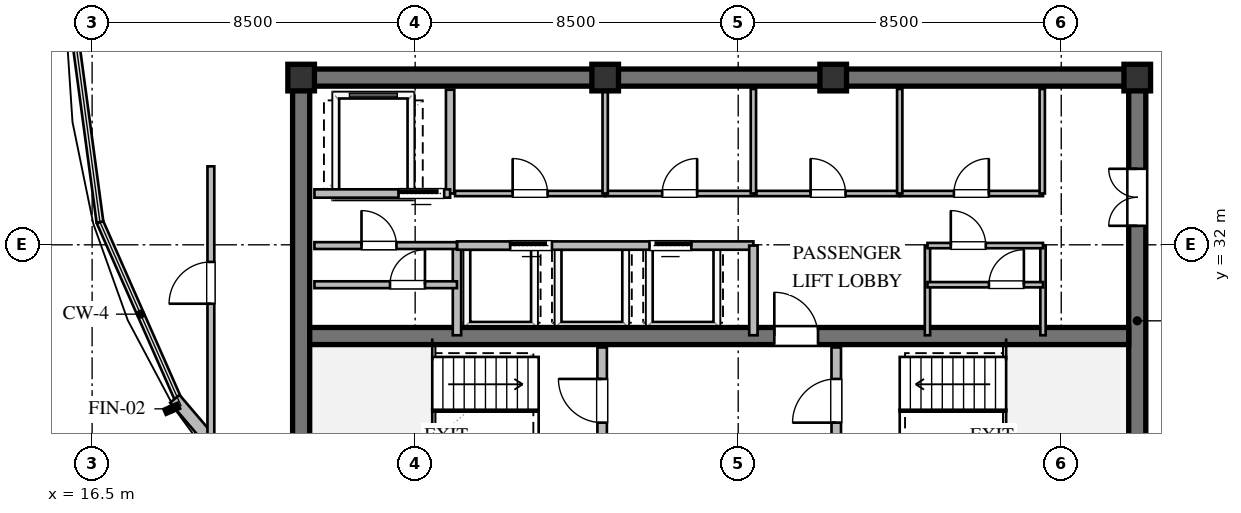
"""IFC4 building model, lengths in metres.
Left out: names, types, materials, properties, quantities, classifications, styles, units other than length and angle.
Written with IfcOpenShell. Run it as: python <this file> out.ifc"""

import sys

from ifc_helpers import new_model, si_unit, direction, frame, frame_2d, origin, origin_2d, place, context, subcontext, project, spatial, rectangle, extrude, element, fill, save


model = new_model("IFC4")
c1 = context("Model", 3, precision=1e-05, world=origin(), true_north=direction((0.0, 1.0)))
c2 = subcontext(c1, "Body", "Model", "MODEL_VIEW")
j1 = project(units=[si_unit("LENGTHUNIT", "METRE"), si_unit("PLANEANGLEUNIT", "RADIAN")], contexts=[c1])
p1 = place(None, origin())
s1 = spatial("IfcSite", under=j1, at=p1, CompositionType="ELEMENT")
p2 = place(p1, origin())
s2 = spatial("IfcBuilding", under=s1, at=p2, CompositionType="ELEMENT")
p3 = place(p2, frame((0.0, 0.0, 270.0)))
s3 = spatial("IfcBuildingStorey", under=s2, at=p3, CompositionType="ELEMENT", Elevation=270.0)
p4 = place(p3, frame((21.775, 36.4, 0.0), z_axis=(0.0, 0.0, 1.0), x_axis=(1.0, 0.0, 0.0)))
e1 = element("IfcWall", 1, at=p4, inside=s3, PredefinedType="SHEAR", context=c2, shape_type="SweptSolid", body=[
    extrude(rectangle(XDim=22.45, YDim=0.45, at=frame_2d((11.225, 0.0))), origin(), (0.0, 0.0, 1.0), 3.56),
])
p5 = place(p3, frame((22.0, 23.825, 0.0), z_axis=(0.0, 0.0, 1.0), x_axis=(0.0, 1.0, 0.0)))
e2 = element("IfcWall", 2, at=p5, inside=s3, PredefinedType="SHEAR", context=c2, shape_type="SweptSolid", body=[
    extrude(rectangle(XDim=12.35, YDim=0.45, at=frame_2d((6.175, 0.0))), origin(), (0.0, 0.0, 1.0), 3.56),
])
p6 = place(p3, frame((44.0, 23.825, 0.0), z_axis=(0.0, 0.0, 1.0), x_axis=(0.0, 1.0, 0.0)))
e3 = element("IfcWall", 3, at=p6, inside=s3, PredefinedType="SHEAR", context=c2, shape_type="SweptSolid", body=[
    extrude(rectangle(XDim=12.35, YDim=0.45, at=frame_2d((6.175, 0.0))), origin(), (0.0, 0.0, 1.0), 3.56),
])
p7 = place(p6, frame((8.675, 0.0, 0.0)))
e4 = element("IfcOpeningElement", 4, at=p7, cuts=e3, PredefinedType="OPENING", context=c2, shape_type="SweptSolid", body=[
    extrude(rectangle(XDim=1.5, YDim=2.15, at=frame_2d((0.75, 1.075))), frame((0.0, 0.235, 0.0), z_axis=(0.0, -1.0, 0.0), x_axis=(1.0, 0.0, 0.0)), (0.0, 0.0, 1.0), 0.47),
])
p8 = place(p3, frame((22.225, 29.6, 0.0), z_axis=(0.0, 0.0, 1.0), x_axis=(1.0, 0.0, 0.0)))
e5 = element("IfcWall", 5, at=p8, inside=s3, PredefinedType="SHEAR", context=c2, shape_type="SweptSolid", body=[
    extrude(rectangle(XDim=21.55, YDim=0.45, at=frame_2d((10.775, 0.0))), origin(), (0.0, 0.0, 1.0), 3.56),
])
p9 = place(p8, frame((12.225, 0.0, 0.0)))
e6 = element("IfcOpeningElement", 6, at=p9, cuts=e5, PredefinedType="OPENING", context=c2, shape_type="SweptSolid", body=[
    extrude(rectangle(XDim=1.15, YDim=2.1, at=frame_2d((0.575, 1.05))), frame((0.0, 0.235, 0.0), z_axis=(0.0, -1.0, 0.0), x_axis=(1.0, 0.0, 0.0)), (0.0, 0.0, 1.0), 0.47),
])
for number, where, z_axis, x_axis in (
    (7, (44.0, 36.4, 0.0), (0.0, 0.0, 1.0), (1.0, 0.0, 0.0)),
    (8, (36.0, 36.4, 0.0), (0.0, 0.0, 1.0), (1.0, 0.0, 0.0)),
    (9, (30.0, 36.4, 0.0), (0.0, 0.0, 1.0), (1.0, 0.0, 0.0)),
    (10, (22.0, 36.4, 0.0), (0.0, 0.0, 1.0), (1.0, 0.0, 0.0)),
):
    element("IfcColumn", number, at=place(p3, frame(where, z_axis=z_axis, x_axis=x_axis)), inside=s3, PredefinedType="COLUMN", context=c2, shape_type="SweptSolid", body=[
        extrude(rectangle(XDim=0.7, YDim=0.7, at=origin_2d()), origin(), (0.0, 0.0, 1.0), 3.8),
    ])
p10 = place(p3, frame((22.46, 23.506, 0.0), z_axis=(0.0, 0.0, 1.0), x_axis=(-0.648393724369, 0.761305180725, 0.0)))
e11 = element("IfcWall", 11, at=p10, inside=s3, PredefinedType="STANDARD", context=c2, shape_type="SweptSolid", body=[
    extrude(rectangle(XDim=5.836, YDim=0.32, at=frame_2d((2.918, 0.0))), origin(), (0.0, 0.0, 1.0), 2.7),
])
p11 = place(p3, frame((29.92, 23.9, 0.0), z_axis=(0.0, 0.0, 1.0), x_axis=(0.0, 1.0, 0.0)))
e12 = element("IfcWall", 12, at=p11, inside=s3, PredefinedType="SOLIDWALL", context=c2, shape_type="SweptSolid", body=[
    extrude(rectangle(XDim=5.4, YDim=0.25, at=frame_2d((2.7, 0.0))), origin(), (0.0, 0.0, 1.0), 3.09),
])
p12 = place(p11, frame((3.421, 0.0, 0.0)))
e13 = element("IfcOpeningElement", 13, at=p12, cuts=e12, PredefinedType="OPENING", context=c2, shape_type="SweptSolid", body=[
    extrude(rectangle(XDim=1.15, YDim=2.1, at=frame_2d((0.575, 1.05))), frame((0.0, 0.135, 0.0), z_axis=(0.0, -1.0, 0.0), x_axis=(1.0, 0.0, 0.0)), (0.0, 0.0, 1.0), 0.27),
])
p13 = place(p3, frame((36.08, 23.9, 0.0), z_axis=(0.0, 0.0, 1.0), x_axis=(0.0, 1.0, 0.0)))
e14 = element("IfcWall", 14, at=p13, inside=s3, PredefinedType="SOLIDWALL", context=c2, shape_type="SweptSolid", body=[
    extrude(rectangle(XDim=5.4, YDim=0.25, at=frame_2d((2.7, 0.0))), origin(), (0.0, 0.0, 1.0), 3.56),
])
p14 = place(p13, frame((3.421, 0.0, 0.0)))
e15 = element("IfcOpeningElement", 15, at=p14, cuts=e14, PredefinedType="OPENING", context=c2, shape_type="SweptSolid", body=[
    extrude(rectangle(XDim=1.15, YDim=2.1, at=frame_2d((0.575, 1.05))), frame((0.0, 0.135, 0.0), z_axis=(0.0, -1.0, 0.0), x_axis=(1.0, 0.0, 0.0)), (0.0, 0.0, 1.0), 0.27),
])
p15 = place(p3, frame((25.92, 33.35, 0.0), z_axis=(0.0, 0.0, 1.0), x_axis=(0.0, 1.0, 0.0)))
e16 = element("IfcWall", 16, at=p15, inside=s3, PredefinedType="SOLIDWALL", context=c2, shape_type="SweptSolid", body=[
    extrude(rectangle(XDim=2.73, YDim=0.22, at=frame_2d((1.365, 0.0))), origin(), (0.0, 0.0, 1.0), 3.56),
])
p16 = place(p3, frame((22.35, 33.35, 0.0), z_axis=(0.0, 0.0, 1.0), x_axis=(1.0, 0.0, 0.0)))
e17 = element("IfcWall", 17, at=p16, inside=s3, PredefinedType="SOLIDWALL", context=c2, shape_type="SweptSolid", body=[
    extrude(rectangle(XDim=3.57, YDim=0.22, at=frame_2d((1.785, 0.0))), origin(), (0.0, 0.0, 1.0), 3.56),
])
p17 = place(p16, frame((2.213, 0.0, 0.0)))
e18 = element("IfcOpeningElement", 18, at=p17, cuts=e17, PredefinedType="OPENING", context=c2, shape_type="SweptSolid", body=[
    extrude(rectangle(XDim=1.2, YDim=2.1, at=frame_2d((0.6, 1.05))), frame((0.0, 0.12, 0.0), z_axis=(0.0, -1.0, 0.0), x_axis=(1.0, 0.0, 0.0)), (0.0, 0.0, 1.0), 0.24),
])
p18 = place(p3, frame((26.1, 29.62, 0.0), z_axis=(0.0, 0.0, 1.0), x_axis=(0.0, 1.0, 0.0)))
e19 = element("IfcWall", 19, at=p18, inside=s3, PredefinedType="SOLIDWALL", context=c2, shape_type="SweptSolid", body=[
    extrude(rectangle(XDim=2.36, YDim=0.22, at=frame_2d((1.18, 0.0))), origin(), (0.0, 0.0, 1.0), 3.56),
])
p19 = place(p3, frame((26.1, 31.98, 0.0), z_axis=(0.0, 0.0, 1.0), x_axis=(1.0, 0.0, 0.0)))
e20 = element("IfcWall", 20, at=p19, inside=s3, PredefinedType="SOLIDWALL", context=c2, shape_type="SweptSolid", body=[
    extrude(rectangle(XDim=7.8, YDim=0.22, at=frame_2d((3.9, 0.0))), origin(), (0.0, 0.0, 1.0), 3.56),
])
p20 = place(p19, frame((1.4, 0.0, 0.0)))
e21 = element("IfcOpeningElement", 21, at=p20, cuts=e20, PredefinedType="OPENING", context=c2, shape_type="SweptSolid", body=[
    extrude(rectangle(XDim=1.1, YDim=2.1, at=frame_2d((0.55, 1.05))), frame((0.0, 0.12, 0.0), z_axis=(0.0, -1.0, 0.0), x_axis=(1.0, 0.0, 0.0)), (0.0, 0.0, 1.0), 0.24),
])
p21 = place(p19, frame((5.066, 0.0, 0.0)))
e22 = element("IfcOpeningElement", 22, at=p21, cuts=e20, PredefinedType="OPENING", context=c2, shape_type="SweptSolid", body=[
    extrude(rectangle(XDim=1.1, YDim=2.1, at=frame_2d((0.55, 1.05))), frame((0.0, 0.12, 0.0), z_axis=(0.0, -1.0, 0.0), x_axis=(1.0, 0.0, 0.0)), (0.0, 0.0, 1.0), 0.24),
])
p22 = place(p3, frame((33.9, 29.62, 0.0), z_axis=(0.0, 0.0, 1.0), x_axis=(0.0, 1.0, 0.0)))
e23 = element("IfcWall", 23, at=p22, inside=s3, PredefinedType="SOLIDWALL", context=c2, shape_type="SweptSolid", body=[
    extrude(rectangle(XDim=2.36, YDim=0.22, at=frame_2d((1.18, 0.0))), origin(), (0.0, 0.0, 1.0), 3.56),
])
p23 = place(p3, frame((26.05, 33.35, 0.0), z_axis=(0.0, 0.0, 1.0), x_axis=(1.0, 0.0, 0.0)))
e24 = element("IfcWall", 24, at=p23, inside=s3, PredefinedType="PARTITIONING", context=c2, shape_type="SweptSolid", body=[
    extrude(rectangle(XDim=3.95, YDim=0.14, at=frame_2d((1.975, 0.0))), origin(), (0.0, 0.0, 1.0), 3.56),
])
p24 = place(p23, frame((1.515, 0.0, 0.0)))
e25 = element("IfcOpeningElement", 25, at=p24, cuts=e24, PredefinedType="OPENING", context=c2, shape_type="SweptSolid", body=[
    extrude(rectangle(XDim=0.92, YDim=2.1, at=frame_2d((0.46, 1.05))), frame((0.0, 0.08, 0.0), z_axis=(0.0, -1.0, 0.0), x_axis=(1.0, 0.0, 0.0)), (0.0, 0.0, 1.0), 0.16),
])
p25 = place(p3, frame((30.0, 33.35, 0.0), z_axis=(0.0, 0.0, 1.0), x_axis=(1.0, 0.0, 0.0)))
e26 = element("IfcWall", 26, at=p25, inside=s3, PredefinedType="PARTITIONING", context=c2, shape_type="SweptSolid", body=[
    extrude(rectangle(XDim=3.92, YDim=0.14, at=frame_2d((1.96, 0.0))), origin(), (0.0, 0.0, 1.0), 3.56),
])
p26 = place(p25, frame((1.5, 0.0, 0.0)))
e27 = element("IfcOpeningElement", 27, at=p26, cuts=e26, PredefinedType="OPENING", context=c2, shape_type="SweptSolid", body=[
    extrude(rectangle(XDim=0.92, YDim=2.1, at=frame_2d((0.46, 1.05))), frame((0.0, 0.08, 0.0), z_axis=(0.0, -1.0, 0.0), x_axis=(1.0, 0.0, 0.0)), (0.0, 0.0, 1.0), 0.16),
])
for number, where, z_axis, x_axis in (
    (28, (30.0, 33.35, 0.0), (0.0, 0.0, 1.0), (0.0, 1.0, 0.0)),
    (29, (33.9, 33.35, 0.0), (0.0, 0.0, 1.0), (0.0, 1.0, 0.0)),
):
    element("IfcWall", number, at=place(p3, frame(where, z_axis=z_axis, x_axis=x_axis)), inside=s3, PredefinedType="PARTITIONING", context=c2, shape_type="SweptSolid", body=[
        extrude(rectangle(XDim=2.75, YDim=0.14, at=frame_2d((1.375, 0.0))), origin(), (0.0, 0.0, 1.0), 3.56),
    ])
p27 = place(p3, frame((33.98, 33.35, 0.0), z_axis=(0.0, 0.0, 1.0), x_axis=(1.0, 0.0, 0.0)))
e30 = element("IfcWall", 30, at=p27, inside=s3, PredefinedType="PARTITIONING", context=c2, shape_type="SweptSolid", body=[
    extrude(rectangle(XDim=3.77, YDim=0.14, at=frame_2d((1.885, 0.0))), origin(), (0.0, 0.0, 1.0), 3.56),
])
p28 = place(p27, frame((1.425, 0.0, 0.0)))
e31 = element("IfcOpeningElement", 31, at=p28, cuts=e30, PredefinedType="OPENING", context=c2, shape_type="SweptSolid", body=[
    extrude(rectangle(XDim=0.92, YDim=2.1, at=frame_2d((0.46, 1.05))), frame((0.0, 0.08, 0.0), z_axis=(0.0, -1.0, 0.0), x_axis=(1.0, 0.0, 0.0)), (0.0, 0.0, 1.0), 0.16),
])
p29 = place(p3, frame((37.75, 33.35, 0.0), z_axis=(0.0, 0.0, 1.0), x_axis=(1.0, 0.0, 0.0)))
e32 = element("IfcWall", 32, at=p29, inside=s3, PredefinedType="PARTITIONING", context=c2, shape_type="SweptSolid", body=[
    extrude(rectangle(XDim=3.77, YDim=0.14, at=frame_2d((1.885, 0.0))), origin(), (0.0, 0.0, 1.0), 3.56),
])
p30 = place(p29, frame((1.425, 0.0, 0.0)))
e33 = element("IfcOpeningElement", 33, at=p30, cuts=e32, PredefinedType="OPENING", context=c2, shape_type="SweptSolid", body=[
    extrude(rectangle(XDim=0.92, YDim=2.1, at=frame_2d((0.46, 1.05))), frame((0.0, 0.08, 0.0), z_axis=(0.0, -1.0, 0.0), x_axis=(1.0, 0.0, 0.0)), (0.0, 0.0, 1.0), 0.16),
])
for number, where, z_axis, x_axis in (
    (34, (37.75, 33.35, 0.0), (0.0, 0.0, 1.0), (0.0, 1.0, 0.0)),
    (35, (41.5, 33.35, 0.0), (0.0, 0.0, 1.0), (0.0, 1.0, 0.0)),
):
    element("IfcWall", number, at=place(p3, frame(where, z_axis=z_axis, x_axis=x_axis)), inside=s3, PredefinedType="PARTITIONING", context=c2, shape_type="SweptSolid", body=[
        extrude(rectangle(XDim=2.75, YDim=0.14, at=frame_2d((1.375, 0.0))), origin(), (0.0, 0.0, 1.0), 3.56),
    ])
p31 = place(p3, frame((22.35, 30.95, 0.0), z_axis=(0.0, 0.0, 1.0), x_axis=(1.0, 0.0, 0.0)))
e36 = element("IfcWall", 36, at=p31, inside=s3, PredefinedType="PARTITIONING", context=c2, shape_type="SweptSolid", body=[
    extrude(rectangle(XDim=3.75, YDim=0.18, at=frame_2d((1.875, 0.0))), origin(), (0.0, 0.0, 1.0), 3.56),
])
p32 = place(p31, frame((1.988, 0.0, 0.0)))
e37 = element("IfcOpeningElement", 37, at=p32, cuts=e36, PredefinedType="OPENING", context=c2, shape_type="SweptSolid", body=[
    extrude(rectangle(XDim=0.92, YDim=2.1, at=frame_2d((0.46, 1.05))), frame((0.0, 0.1, 0.0), z_axis=(0.0, -1.0, 0.0), x_axis=(1.0, 0.0, 0.0)), (0.0, 0.0, 1.0), 0.2),
])
p33 = place(p3, frame((22.35, 31.98, 0.0), z_axis=(0.0, 0.0, 1.0), x_axis=(1.0, 0.0, 0.0)))
e38 = element("IfcWall", 38, at=p33, inside=s3, PredefinedType="PARTITIONING", context=c2, shape_type="SweptSolid", body=[
    extrude(rectangle(XDim=3.75, YDim=0.18, at=frame_2d((1.875, 0.0))), origin(), (0.0, 0.0, 1.0), 3.56),
])
p34 = place(p33, frame((1.238, 0.0, 0.0)))
e39 = element("IfcOpeningElement", 39, at=p34, cuts=e38, PredefinedType="OPENING", context=c2, shape_type="SweptSolid", body=[
    extrude(rectangle(XDim=0.92, YDim=2.1, at=frame_2d((0.46, 1.05))), frame((0.0, 0.1, 0.0), z_axis=(0.0, -1.0, 0.0), x_axis=(1.0, 0.0, 0.0)), (0.0, 0.0, 1.0), 0.2),
])
for number, where, z_axis, x_axis in (
    (40, (38.48, 29.62, 0.0), (0.0, 0.0, 1.0), (0.0, 1.0, 0.0)),
    (41, (41.52, 29.62, 0.0), (0.0, 0.0, 1.0), (0.0, 1.0, 0.0)),
):
    element("IfcWall", number, at=place(p3, frame(where, z_axis=z_axis, x_axis=x_axis)), inside=s3, PredefinedType="PARTITIONING", context=c2, shape_type="SweptSolid", body=[
        extrude(rectangle(XDim=2.36, YDim=0.14, at=frame_2d((1.18, 0.0))), origin(), (0.0, 0.0, 1.0), 3.56),
    ])
p35 = place(p3, frame((38.48, 30.95, 0.0), z_axis=(0.0, 0.0, 1.0), x_axis=(1.0, 0.0, 0.0)))
e42 = element("IfcWall", 42, at=p35, inside=s3, PredefinedType="PARTITIONING", context=c2, shape_type="SweptSolid", body=[
    extrude(rectangle(XDim=3.04, YDim=0.14, at=frame_2d((1.52, 0.0))), origin(), (0.0, 0.0, 1.0), 3.56),
])
p36 = place(p35, frame((1.617, 0.0, 0.0)))
e43 = element("IfcOpeningElement", 43, at=p36, cuts=e42, PredefinedType="OPENING", context=c2, shape_type="SweptSolid", body=[
    extrude(rectangle(XDim=0.92, YDim=2.1, at=frame_2d((0.46, 1.05))), frame((0.0, 0.08, 0.0), z_axis=(0.0, -1.0, 0.0), x_axis=(1.0, 0.0, 0.0)), (0.0, 0.0, 1.0), 0.16),
])
p37 = place(p3, frame((38.48, 31.98, 0.0), z_axis=(0.0, 0.0, 1.0), x_axis=(1.0, 0.0, 0.0)))
e44 = element("IfcWall", 44, at=p37, inside=s3, PredefinedType="PARTITIONING", context=c2, shape_type="SweptSolid", body=[
    extrude(rectangle(XDim=3.04, YDim=0.14, at=frame_2d((1.52, 0.0))), origin(), (0.0, 0.0, 1.0), 3.56),
])
p38 = place(p37, frame((0.614, 0.0, 0.0)))
e45 = element("IfcOpeningElement", 45, at=p38, cuts=e44, PredefinedType="OPENING", context=c2, shape_type="SweptSolid", body=[
    extrude(rectangle(XDim=0.92, YDim=2.1, at=frame_2d((0.46, 1.05))), frame((0.0, 0.08, 0.0), z_axis=(0.0, -1.0, 0.0), x_axis=(1.0, 0.0, 0.0)), (0.0, 0.0, 1.0), 0.16),
])
p39 = place(p3, frame((19.625, 26.845, 0.0), z_axis=(0.0, 0.0, 1.0), x_axis=(0.0, 1.0, 0.0)))
e46 = element("IfcWall", 46, at=p39, inside=s3, PredefinedType="PARTITIONING", context=c2, shape_type="SweptSolid", body=[
    extrude(rectangle(XDim=7.22, YDim=0.18, at=frame_2d((3.61, 0.0))), origin(), (0.0, 0.0, 1.0), 3.017),
])
p40 = place(p39, frame((3.605, 0.0, 0.0)))
e47 = element("IfcOpeningElement", 47, at=p40, cuts=e46, PredefinedType="OPENING", context=c2, shape_type="SweptSolid", body=[
    extrude(rectangle(XDim=1.1, YDim=2.1, at=frame_2d((0.55, 1.05))), frame((0.0, 0.1, 0.0), z_axis=(0.0, -1.0, 0.0), x_axis=(1.0, 0.0, 0.0)), (0.0, 0.0, 1.0), 0.2),
])
p41 = place(p12, origin())
e48 = element("IfcDoor", 48, at=p41, inside=s3, OperationType="SINGLE_SWING_RIGHT", PredefinedType="DOOR", context=c2, shape_type="SweptSolid", body=[
    extrude(rectangle(XDim=1.15, YDim=2.1, at=frame_2d((0.575, 1.05))), frame((0.0, 0.025, 0.0), z_axis=(0.0, -1.0, 0.0), x_axis=(1.0, 0.0, 0.0)), (0.0, 0.0, 1.0), 0.05),
])
fill(e13, e48)
p42 = place(p14, origin())
e49 = element("IfcDoor", 49, at=p42, inside=s3, OperationType="SINGLE_SWING_LEFT", PredefinedType="DOOR", context=c2, shape_type="SweptSolid", body=[
    extrude(rectangle(XDim=1.15, YDim=2.1, at=frame_2d((0.575, 1.05))), frame((0.0, 0.025, 0.0), z_axis=(0.0, -1.0, 0.0), x_axis=(1.0, 0.0, 0.0)), (0.0, 0.0, 1.0), 0.05),
])
fill(e15, e49)
p43 = place(p9, origin())
e50 = element("IfcDoor", 50, at=p43, inside=s3, OperationType="SINGLE_SWING_LEFT", PredefinedType="DOOR", context=c2, shape_type="SweptSolid", body=[
    extrude(rectangle(XDim=1.15, YDim=2.1, at=frame_2d((0.575, 1.05))), frame((0.0, 0.025, 0.0), z_axis=(0.0, -1.0, 0.0), x_axis=(1.0, 0.0, 0.0)), (0.0, 0.0, 1.0), 0.05),
])
fill(e6, e50)
p44 = place(p7, origin())
e51 = element("IfcDoor", 51, at=p44, inside=s3, OperationType="DOUBLE_DOOR_SINGLE_SWING", PredefinedType="DOOR", context=c2, shape_type="SweptSolid", body=[
    extrude(rectangle(XDim=1.5, YDim=2.15, at=frame_2d((0.75, 1.075))), frame((0.0, 0.025, 0.0), z_axis=(0.0, -1.0, 0.0), x_axis=(1.0, 0.0, 0.0)), (0.0, 0.0, 1.0), 0.05),
])
fill(e4, e51)
p45 = place(p17, origin())
e52 = element("IfcDoor", 52, at=p45, inside=s3, OperationType="SLIDING_TO_LEFT", PredefinedType="DOOR", context=c2, shape_type="SweptSolid", body=[
    extrude(rectangle(XDim=1.2, YDim=2.1, at=frame_2d((0.6, 1.05))), frame((0.0, 0.025, 0.0), z_axis=(0.0, -1.0, 0.0), x_axis=(1.0, 0.0, 0.0)), (0.0, 0.0, 1.0), 0.05),
])
fill(e18, e52)
p46 = place(p20, origin())
e53 = element("IfcDoor", 53, at=p46, inside=s3, OperationType="SLIDING_TO_LEFT", PredefinedType="DOOR", context=c2, shape_type="SweptSolid", body=[
    extrude(rectangle(XDim=1.1, YDim=2.1, at=frame_2d((0.55, 1.05))), frame((0.0, 0.025, 0.0), z_axis=(0.0, -1.0, 0.0), x_axis=(1.0, 0.0, 0.0)), (0.0, 0.0, 1.0), 0.05),
])
fill(e21, e53)
p47 = place(p21, origin())
e54 = element("IfcDoor", 54, at=p47, inside=s3, OperationType="SLIDING_TO_RIGHT", PredefinedType="DOOR", context=c2, shape_type="SweptSolid", body=[
    extrude(rectangle(XDim=1.1, YDim=2.1, at=frame_2d((0.55, 1.05))), frame((0.0, 0.025, 0.0), z_axis=(0.0, -1.0, 0.0), x_axis=(1.0, 0.0, 0.0)), (0.0, 0.0, 1.0), 0.05),
])
fill(e22, e54)
p48 = place(p24, origin())
e55 = element("IfcDoor", 55, at=p48, inside=s3, OperationType="SINGLE_SWING_LEFT", PredefinedType="DOOR", context=c2, shape_type="SweptSolid", body=[
    extrude(rectangle(XDim=0.92, YDim=2.1, at=frame_2d((0.46, 1.05))), frame((0.0, 0.025, 0.0), z_axis=(0.0, -1.0, 0.0), x_axis=(1.0, 0.0, 0.0)), (0.0, 0.0, 1.0), 0.05),
])
fill(e25, e55)
p49 = place(p26, origin())
e56 = element("IfcDoor", 56, at=p49, inside=s3, OperationType="SINGLE_SWING_RIGHT", PredefinedType="DOOR", context=c2, shape_type="SweptSolid", body=[
    extrude(rectangle(XDim=0.92, YDim=2.1, at=frame_2d((0.46, 1.05))), frame((0.0, 0.025, 0.0), z_axis=(0.0, -1.0, 0.0), x_axis=(1.0, 0.0, 0.0)), (0.0, 0.0, 1.0), 0.05),
])
fill(e27, e56)
p50 = place(p28, origin())
e57 = element("IfcDoor", 57, at=p50, inside=s3, OperationType="SINGLE_SWING_LEFT", PredefinedType="DOOR", context=c2, shape_type="SweptSolid", body=[
    extrude(rectangle(XDim=0.92, YDim=2.1, at=frame_2d((0.46, 1.05))), frame((0.0, 0.025, 0.0), z_axis=(0.0, -1.0, 0.0), x_axis=(1.0, 0.0, 0.0)), (0.0, 0.0, 1.0), 0.05),
])
fill(e31, e57)
p51 = place(p30, origin())
e58 = element("IfcDoor", 58, at=p51, inside=s3, OperationType="SINGLE_SWING_RIGHT", PredefinedType="DOOR", context=c2, shape_type="SweptSolid", body=[
    extrude(rectangle(XDim=0.92, YDim=2.1, at=frame_2d((0.46, 1.05))), frame((0.0, 0.025, 0.0), z_axis=(0.0, -1.0, 0.0), x_axis=(1.0, 0.0, 0.0)), (0.0, 0.0, 1.0), 0.05),
])
fill(e33, e58)
p52 = place(p34, origin())
e59 = element("IfcDoor", 59, at=p52, inside=s3, OperationType="SINGLE_SWING_LEFT", PredefinedType="DOOR", context=c2, shape_type="SweptSolid", body=[
    extrude(rectangle(XDim=0.92, YDim=2.1, at=frame_2d((0.46, 1.05))), frame((0.0, 0.025, 0.0), z_axis=(0.0, -1.0, 0.0), x_axis=(1.0, 0.0, 0.0)), (0.0, 0.0, 1.0), 0.05),
])
fill(e39, e59)
p53 = place(p32, origin())
e60 = element("IfcDoor", 60, at=p53, inside=s3, OperationType="SINGLE_SWING_RIGHT", PredefinedType="DOOR", context=c2, shape_type="SweptSolid", body=[
    extrude(rectangle(XDim=0.92, YDim=2.1, at=frame_2d((0.46, 1.05))), frame((0.0, 0.025, 0.0), z_axis=(0.0, -1.0, 0.0), x_axis=(1.0, 0.0, 0.0)), (0.0, 0.0, 1.0), 0.05),
])
fill(e37, e60)
p54 = place(p38, origin())
e61 = element("IfcDoor", 61, at=p54, inside=s3, OperationType="SINGLE_SWING_LEFT", PredefinedType="DOOR", context=c2, shape_type="SweptSolid", body=[
    extrude(rectangle(XDim=0.92, YDim=2.1, at=frame_2d((0.46, 1.05))), frame((0.0, 0.025, 0.0), z_axis=(0.0, -1.0, 0.0), x_axis=(1.0, 0.0, 0.0)), (0.0, 0.0, 1.0), 0.05),
])
fill(e45, e61)
p55 = place(p36, origin())
e62 = element("IfcDoor", 62, at=p55, inside=s3, OperationType="SINGLE_SWING_RIGHT", PredefinedType="DOOR", context=c2, shape_type="SweptSolid", body=[
    extrude(rectangle(XDim=0.92, YDim=2.1, at=frame_2d((0.46, 1.05))), frame((0.0, 0.025, 0.0), z_axis=(0.0, -1.0, 0.0), x_axis=(1.0, 0.0, 0.0)), (0.0, 0.0, 1.0), 0.05),
])
fill(e43, e62)
p56 = place(p40, origin())
e63 = element("IfcDoor", 63, at=p56, inside=s3, OperationType="SINGLE_SWING_LEFT", PredefinedType="DOOR", context=c2, shape_type="SweptSolid", body=[
    extrude(rectangle(XDim=1.1, YDim=2.1, at=frame_2d((0.55, 1.05))), frame((0.0, 0.025, 0.0), z_axis=(0.0, -1.0, 0.0), x_axis=(1.0, 0.0, 0.0)), (0.0, 0.0, 1.0), 0.05),
])
fill(e47, e63)
save(model, sys.argv[1])
